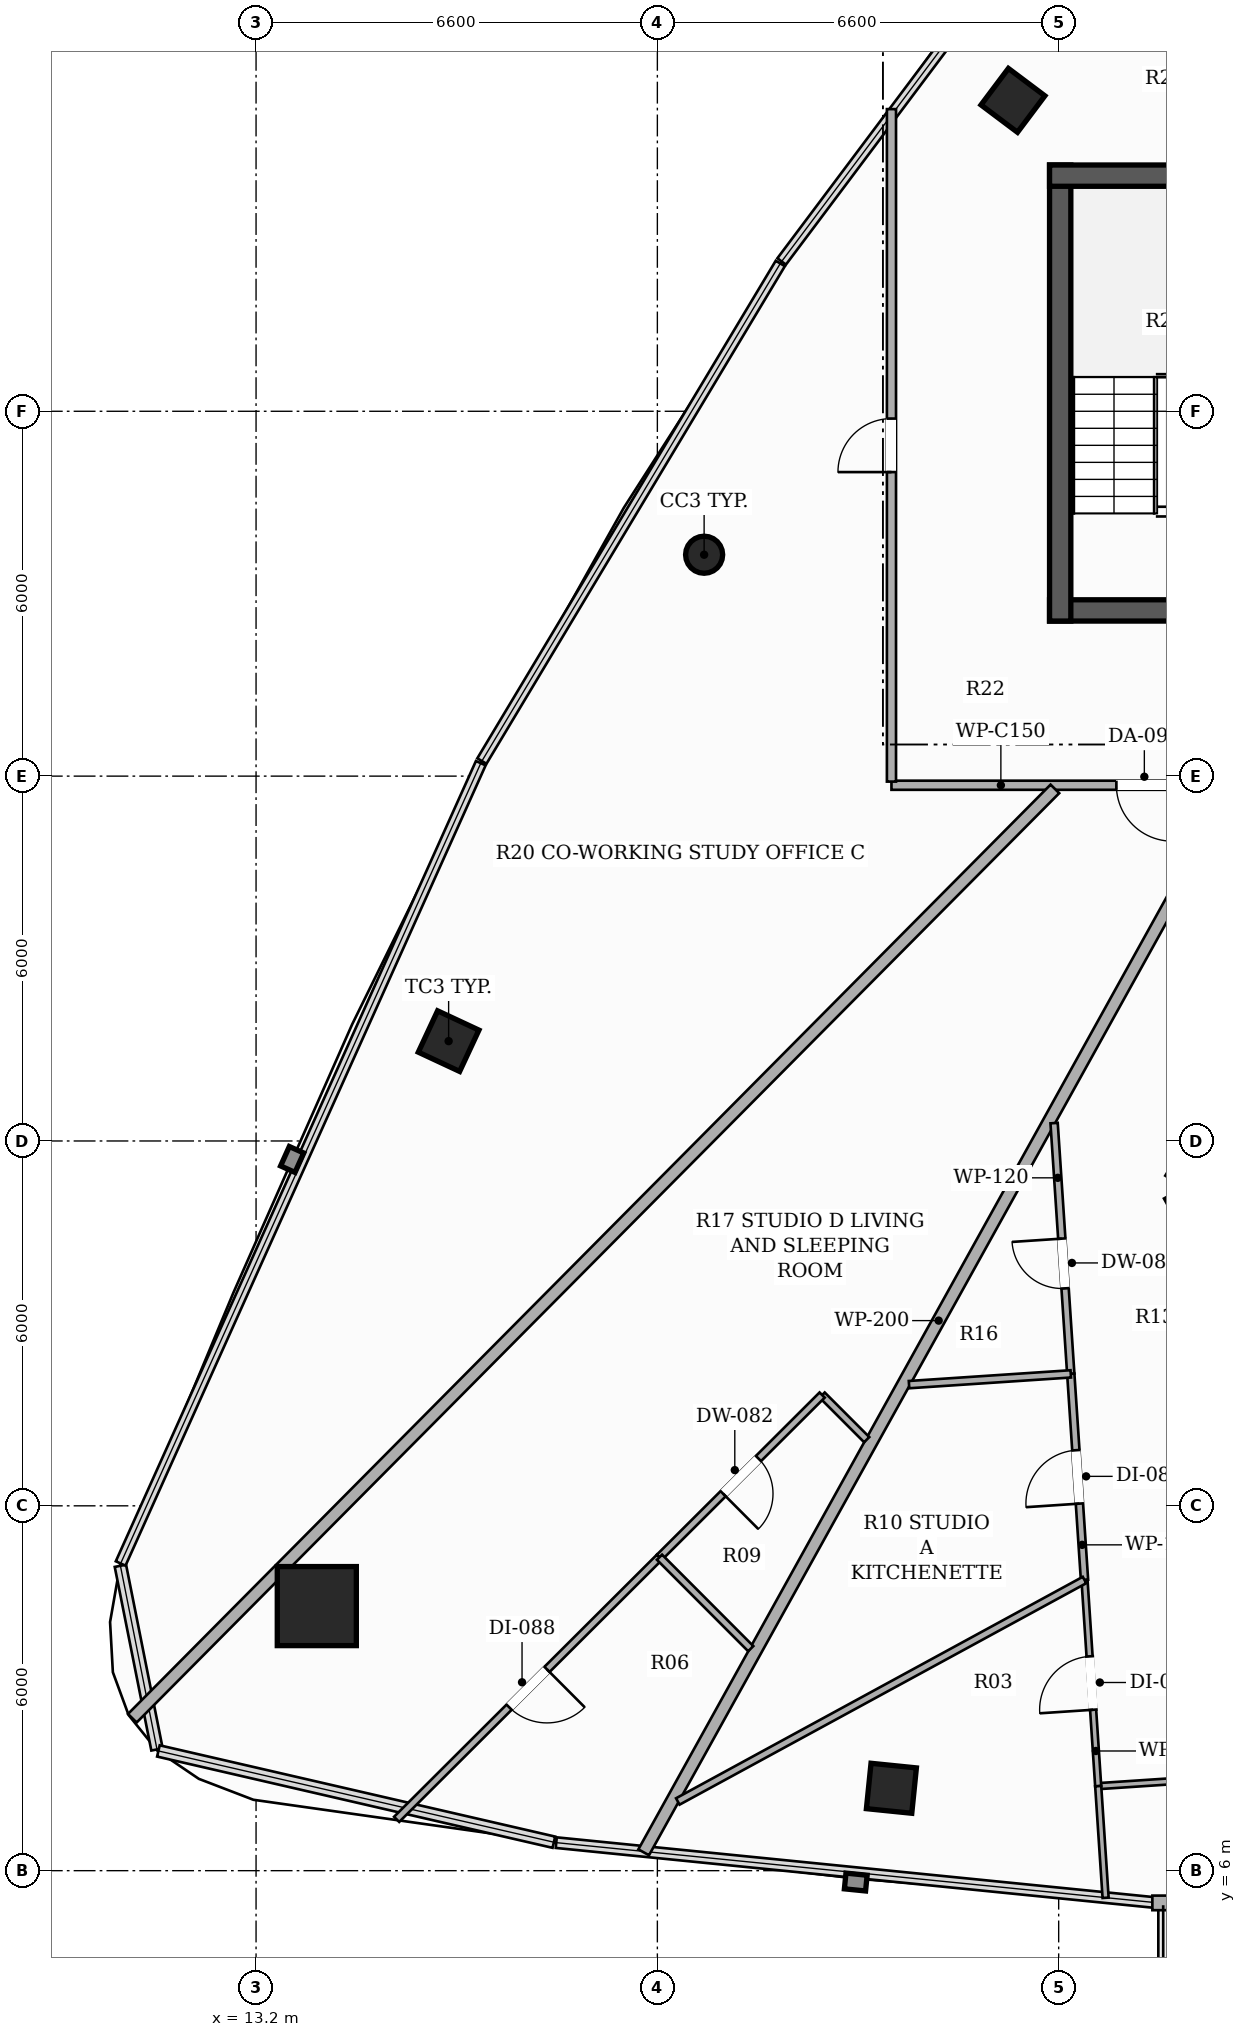
"""IFC4 building model, lengths in metres.
Left out: names, types, materials, properties, quantities, classifications, styles, units other than length and angle.
Written with IfcOpenShell. Run it as: python <this file> out.ifc"""

import sys

from ifc_helpers import new_model, si_unit, direction, frame, frame_2d, origin, origin_2d, place, context, subcontext, project, spatial, rectangle, hollow_rectangle, hollow_circle, extrude, element, fill, save


model = new_model("IFC4")
c1 = context("Model", 3, precision=1e-05, world=origin(), true_north=direction((0.0, 1.0)))
c2 = subcontext(c1, "Body", "Model", "MODEL_VIEW")
j1 = project(units=[si_unit("LENGTHUNIT", "METRE"), si_unit("PLANEANGLEUNIT", "RADIAN")], contexts=[c1])
p1 = place(None, origin())
s1 = spatial("IfcSite", under=j1, at=p1, CompositionType="ELEMENT")
p2 = place(p1, origin())
s2 = spatial("IfcBuilding", under=s1, at=p2, CompositionType="ELEMENT")
p3 = place(p2, frame((0.0, 0.0, 250.25)))
s3 = spatial("IfcBuildingStorey", under=s2, at=p3, CompositionType="ELEMENT", Elevation=250.25)
p4 = place(p3, frame((26.25, 26.725, 0.0), z_axis=(0.0, 0.0, 1.0), x_axis=(1.0, 0.0, 0.0)))
e1 = element("IfcWall", 1, at=p4, inside=s3, PredefinedType="SHEAR", context=c2, shape_type="SweptSolid", body=[
    extrude(rectangle(XDim=13.5, YDim=0.35, at=frame_2d((6.75, 0.0))), origin(), (0.0, 0.0, 1.0), 3.3),
])
p5 = place(p4, frame((4.35, 0.0, 0.0)))
e2 = element("IfcOpeningElement", 2, at=p5, cuts=e1, PredefinedType="OPENING", context=c2, shape_type="SweptSolid", body=[
    extrude(rectangle(XDim=1.05, YDim=2.15, at=frame_2d((0.525, 1.075))), frame((0.0, 0.185, 0.0), z_axis=(0.0, -1.0, 0.0), x_axis=(1.0, 0.0, 0.0)), (0.0, 0.0, 1.0), 0.37),
])
p6 = place(p4, frame((8.3, 0.0, 0.0)))
e3 = element("IfcOpeningElement", 3, at=p6, cuts=e1, PredefinedType="OPENING", context=c2, shape_type="SweptSolid", body=[
    extrude(rectangle(XDim=1.05, YDim=2.15, at=frame_2d((0.525, 1.075))), frame((0.0, 0.185, 0.0), z_axis=(0.0, -1.0, 0.0), x_axis=(1.0, 0.0, 0.0)), (0.0, 0.0, 1.0), 0.37),
])
p7 = place(p3, frame((26.425, 26.55, 0.0), z_axis=(0.0, 0.0, 1.0), x_axis=(0.0, 1.0, 0.0)))
e4 = element("IfcWall", 4, at=p7, inside=s3, PredefinedType="SHEAR", context=c2, shape_type="SweptSolid", body=[
    extrude(rectangle(XDim=7.5, YDim=0.35, at=frame_2d((3.75, 0.0))), origin(), (0.0, 0.0, 1.0), 3.3),
])
p8 = place(p3, frame((26.25, 33.875, 0.0), z_axis=(0.0, 0.0, 1.0), x_axis=(1.0, 0.0, 0.0)))
e5 = element("IfcWall", 5, at=p8, inside=s3, PredefinedType="SHEAR", context=c2, shape_type="SweptSolid", body=[
    extrude(rectangle(XDim=3.6, YDim=0.35, at=frame_2d((1.8, 0.0))), origin(), (0.0, 0.0, 1.0), 3.3),
])
p9 = place(p3, frame((14.199, 10.351, 0.0), z_axis=(0.0, 0.0, 1.0), x_axis=(1.0, 0.0, 0.0)))
e6 = element("IfcColumn", 6, at=p9, inside=s3, PredefinedType="COLUMN", context=c2, shape_type="SweptSolid", body=[
    extrude(hollow_rectangle(XDim=1.3, YDim=1.3, WallThickness=0.04, at=origin_2d()), origin(), (0.0, 0.0, 1.0), 3.3),
])
p10 = place(p3, frame((25.648, 35.113, 0.0), z_axis=(0.0, 0.0, 1.0), x_axis=(0.600420225326, 0.799684658487, 0.0)))
e7 = element("IfcColumn", 7, at=p10, inside=s3, PredefinedType="COLUMN", context=c2, shape_type="SweptSolid", body=[
    extrude(hollow_rectangle(XDim=0.75, YDim=0.75, WallThickness=0.025, at=origin_2d()), origin(), (0.0, 0.0, 1.0), 3.3),
])
p11 = place(p3, frame((20.569, 27.641, 0.0), z_axis=(0.0, 0.0, 1.0), x_axis=(1.0, 0.0, 0.0)))
e8 = element("IfcColumn", 8, at=p11, inside=s3, PredefinedType="COLUMN", context=c2, shape_type="SweptSolid", body=[
    extrude(hollow_circle(Radius=0.305, WallThickness=0.016, at=origin_2d()), origin(), (0.0, 0.0, 1.0), 3.3),
])
for number, where, z_axis, x_axis in (
    (9, (16.367, 19.642, 0.0), (0.0, 0.0, 1.0), (0.423, 0.906, 0.0)),
    (10, (23.649, 7.355, 0.0), (0.0, 0.0, 1.0), (-0.995, 0.101, 0.0)),
):
    element("IfcColumn", number, at=place(p3, frame(where, z_axis=z_axis, x_axis=x_axis)), inside=s3, PredefinedType="COLUMN", context=c2, shape_type="SweptSolid", body=[
        extrude(hollow_rectangle(XDim=0.75, YDim=0.75, WallThickness=0.025, at=origin_2d()), origin(), (0.0, 0.0, 1.0), 3.3),
    ])
p12 = place(p3, frame((27.941, 5.47, 0.0), z_axis=(0.0, 0.0, 1.0), x_axis=(1.0, 0.0, 0.0)))
e11 = element("IfcWall", 11, at=p12, inside=s3, PredefinedType="SOLIDWALL", context=c2, shape_type="SweptSolid", body=[
    extrude(rectangle(XDim=10.118, YDim=0.24, at=frame_2d((5.059, 0.0))), origin(), (0.0, 0.0, 1.0), 2.624),
])
p13 = place(p12, frame((7.62, 0.0, 0.0)))
e12 = element("IfcOpeningElement", 12, at=p13, cuts=e11, PredefinedType="OPENING", context=c2, shape_type="SweptSolid", body=[
    extrude(rectangle(XDim=1.8, YDim=2.2, at=frame_2d((0.9, 1.1))), frame((0.0, 0.13, 0.0), z_axis=(0.0, -1.0, 0.0), x_axis=(1.0, 0.0, 0.0)), (0.0, 0.0, 1.0), 0.26),
])
p14 = place(p3, frame((32.165, 23.85, 0.0), z_axis=(0.0, 0.0, 1.0), x_axis=(-1.0, 0.0, 0.0)))
e13 = element("IfcWall", 13, at=p14, inside=s3, PredefinedType="PARTITIONING", context=c2, shape_type="SweptSolid", body=[
    extrude(rectangle(XDim=8.515, YDim=0.15, at=frame_2d((4.258, 0.0))), origin(), (0.0, 0.0, 1.0), 2.565),
])
p15 = place(p14, frame((1.133, 0.0, 0.0)))
e14 = element("IfcOpeningElement", 14, at=p15, cuts=e13, PredefinedType="OPENING", context=c2, shape_type="SweptSolid", body=[
    extrude(rectangle(XDim=0.92, YDim=2.15, at=frame_2d((0.46, 1.075))), frame((0.0, 0.085, 0.0), z_axis=(0.0, -1.0, 0.0), x_axis=(1.0, 0.0, 0.0)), (0.0, 0.0, 1.0), 0.17),
])
p16 = place(p14, frame((3.896, 0.0, 0.0)))
e15 = element("IfcOpeningElement", 15, at=p16, cuts=e13, PredefinedType="OPENING", context=c2, shape_type="SweptSolid", body=[
    extrude(rectangle(XDim=0.92, YDim=2.15, at=frame_2d((0.46, 1.075))), frame((0.0, 0.085, 0.0), z_axis=(0.0, -1.0, 0.0), x_axis=(1.0, 0.0, 0.0)), (0.0, 0.0, 1.0), 0.17),
])
p17 = place(p3, frame((23.65, 23.91, 0.0), z_axis=(0.0, 0.0, 1.0), x_axis=(0.0, 1.0, 0.0)))
e16 = element("IfcWall", 16, at=p17, inside=s3, PredefinedType="PARTITIONING", context=c2, shape_type="SweptSolid", body=[
    extrude(rectangle(XDim=11.059, YDim=0.15, at=frame_2d((5.53, 0.0))), origin(), (0.0, 0.0, 1.0), 2.492),
])
p18 = place(p17, frame((5.09, 0.0, 0.0)))
e17 = element("IfcOpeningElement", 17, at=p18, cuts=e16, PredefinedType="OPENING", context=c2, shape_type="SweptSolid", body=[
    extrude(rectangle(XDim=0.88, YDim=2.1, at=frame_2d((0.44, 1.05))), frame((0.0, 0.085, 0.0), z_axis=(0.0, -1.0, 0.0), x_axis=(1.0, 0.0, 0.0)), (0.0, 0.0, 1.0), 0.17),
])
p19 = place(p3, frame((28.639, 16.286, 0.0), z_axis=(0.0, 0.0, 1.0), x_axis=(-0.481571453054, 0.876406832244, 0.0)))
e18 = element("IfcWall", 18, at=p19, inside=s3, PredefinedType="PARTITIONING", context=c2, shape_type="SweptSolid", body=[
    extrude(rectangle(XDim=0.918, YDim=0.15, at=frame_2d((0.459, 0.0))), origin(), (0.0, 0.0, 1.0), 3.06),
])
p20 = place(p3, frame((28.217, 17.39, 0.0), z_axis=(0.0, 0.0, 1.0), x_axis=(0.522011859837, 0.852938226479, 0.0)))
e19 = element("IfcWall", 19, at=p20, inside=s3, PredefinedType="PARTITIONING", context=c2, shape_type="SweptSolid", body=[
    extrude(rectangle(XDim=7.504, YDim=0.15, at=frame_2d((3.752, 0.0))), origin(), (0.0, 0.0, 1.0), 2.773),
])
p21 = place(p3, frame((19.575, 6.302, 0.0), z_axis=(0.0, 0.0, 1.0), x_axis=(0.485129783088, 0.874442161358, 0.0)))
e20 = element("IfcWall", 20, at=p21, inside=s3, PredefinedType="PARTITIONING", context=c2, shape_type="SweptSolid", body=[
    extrude(rectangle(XDim=19.999, YDim=0.2, at=frame_2d((10.0, 0.0))), origin(), (0.0, 0.0, 1.0), 2.492),
])
p22 = place(p3, frame((26.338, 23.79, 0.0), z_axis=(0.0, 0.0, 1.0), x_axis=(-0.70454576136, -0.70965855885, 0.0)))
e21 = element("IfcWall", 21, at=p22, inside=s3, PredefinedType="PARTITIONING", context=c2, shape_type="SweptSolid", body=[
    extrude(rectangle(XDim=21.536, YDim=0.2, at=frame_2d((10.768, 0.0))), origin(), (0.0, 0.0, 1.0), 2.492),
])
p23 = place(p3, frame((26.599, 14.17, 0.0), z_axis=(0.0, 0.0, 1.0), x_axis=(-0.066334744758, 0.997797425151, 0.0)))
e22 = element("IfcWall", 22, at=p23, inside=s3, PredefinedType="PARTITIONING", context=c2, shape_type="SweptSolid", body=[
    extrude(rectangle(XDim=4.133, YDim=0.12, at=frame_2d((2.066, 0.0))), origin(), (0.0, 0.0, 1.0), 2.773),
])
p24 = place(p23, frame((1.409, 0.0, 0.0)))
e23 = element("IfcOpeningElement", 23, at=p24, cuts=e22, PredefinedType="OPENING", context=c2, shape_type="SweptSolid", body=[
    extrude(rectangle(XDim=0.82, YDim=2.1, at=frame_2d((0.41, 1.05))), frame((0.0, 0.07, 0.0), z_axis=(0.0, -1.0, 0.0), x_axis=(1.0, 0.0, 0.0)), (0.0, 0.0, 1.0), 0.14),
])
p25 = place(p3, frame((26.825, 10.78, 0.0), z_axis=(0.0, 0.0, 1.0), x_axis=(-0.066471315173, 0.997788336402, 0.0)))
e24 = element("IfcWall", 24, at=p25, inside=s3, PredefinedType="PARTITIONING", context=c2, shape_type="SweptSolid", body=[
    extrude(rectangle(XDim=3.397, YDim=0.12, at=frame_2d((1.699, 0.0))), origin(), (0.0, 0.0, 1.0), 3.06),
])
p26 = place(p25, frame((1.259, 0.0, 0.0)))
e25 = element("IfcOpeningElement", 25, at=p26, cuts=e24, PredefinedType="OPENING", context=c2, shape_type="SweptSolid", body=[
    extrude(rectangle(XDim=0.88, YDim=2.1, at=frame_2d((0.44, 1.05))), frame((0.0, 0.07, 0.0), z_axis=(0.0, -1.0, 0.0), x_axis=(1.0, 0.0, 0.0)), (0.0, 0.0, 1.0), 0.14),
])
p27 = place(p3, frame((37.877, 8.11, 0.0), z_axis=(0.0, 0.0, 1.0), x_axis=(-0.997794804299, -0.066374155471, 0.0)))
e26 = element("IfcWall", 26, at=p27, inside=s3, PredefinedType="PARTITIONING", context=c2, shape_type="SweptSolid", body=[
    extrude(rectangle(XDim=10.851, YDim=0.1, at=frame_2d((5.425, 0.0))), origin(), (0.0, 0.0, 1.0), 2.492),
])
p28 = place(p27, frame((5.68, 0.0, 0.0)))
e27 = element("IfcOpeningElement", 27, at=p28, cuts=e26, PredefinedType="OPENING", context=c2, shape_type="SweptSolid", body=[
    extrude(rectangle(XDim=0.88, YDim=2.1, at=frame_2d((0.44, 1.05))), frame((0.0, 0.06, 0.0), z_axis=(0.0, -1.0, 0.0), x_axis=(1.0, 0.0, 0.0)), (0.0, 0.0, 1.0), 0.12),
])
p29 = place(p3, frame((27.05, 7.39, 0.0), z_axis=(0.0, 0.0, 1.0), x_axis=(-0.066251929929, 0.997802927326, 0.0)))
e28 = element("IfcWall", 28, at=p29, inside=s3, PredefinedType="PARTITIONING", context=c2, shape_type="SweptSolid", body=[
    extrude(rectangle(XDim=3.398, YDim=0.1, at=frame_2d((1.699, 0.0))), origin(), (0.0, 0.0, 1.0), 2.492),
])
p30 = place(p29, frame((1.259, 0.0, 0.0)))
e29 = element("IfcOpeningElement", 29, at=p30, cuts=e28, PredefinedType="OPENING", context=c2, shape_type="SweptSolid", body=[
    extrude(rectangle(XDim=0.88, YDim=2.1, at=frame_2d((0.44, 1.05))), frame((0.0, 0.06, 0.0), z_axis=(0.0, -1.0, 0.0), x_axis=(1.0, 0.0, 0.0)), (0.0, 0.0, 1.0), 0.12),
])
p31 = place(p3, frame((26.599, 14.17, 0.0), z_axis=(0.0, 0.0, 1.0), x_axis=(-0.99779365881, -0.066391373223, 0.0)))
e30 = element("IfcWall", 30, at=p31, inside=s3, PredefinedType="PARTITIONING", context=c2, shape_type="SweptSolid", body=[
    extrude(rectangle(XDim=2.666, YDim=0.12, at=frame_2d((1.333, 0.0))), origin(), (0.0, 0.0, 1.0), 2.773),
])
p32 = place(p3, frame((26.825, 10.78, 0.0), z_axis=(0.0, 0.0, 1.0), x_axis=(-0.87825059366, -0.478200684583, 0.0)))
e31 = element("IfcWall", 31, at=p32, inside=s3, PredefinedType="PARTITIONING", context=c2, shape_type="SweptSolid", body=[
    extrude(rectangle(XDim=7.616, YDim=0.12, at=frame_2d((3.808, 0.0))), origin(), (0.0, 0.0, 1.0), 2.492),
])
p33 = place(p3, frame((27.172, 5.554, 0.0), z_axis=(0.0, 0.0, 1.0), x_axis=(-0.066342877953, 0.997796884413, 0.0)))
e32 = element("IfcWall", 32, at=p33, inside=s3, PredefinedType="PARTITIONING", context=c2, shape_type="SweptSolid", body=[
    extrude(rectangle(XDim=1.84, YDim=0.1, at=frame_2d((0.92, 0.0))), origin(), (0.0, 0.0, 1.0), 2.492),
])
p34 = place(p3, frame((23.243, 13.088, 0.0), z_axis=(0.0, 0.0, 1.0), x_axis=(-0.706518163511, 0.707694909286, 0.0)))
e33 = element("IfcWall", 33, at=p34, inside=s3, PredefinedType="PARTITIONING", context=c2, shape_type="SweptSolid", body=[
    extrude(rectangle(XDim=1.037, YDim=0.12, at=frame_2d((0.519, 0.0))), origin(), (0.0, 0.0, 1.0), 3.06),
])
p35 = place(p3, frame((22.51, 13.822, 0.0), z_axis=(0.0, 0.0, 1.0), x_axis=(-0.708172404385, -0.706039549649, 0.0)))
e34 = element("IfcWall", 34, at=p35, inside=s3, PredefinedType="PARTITIONING", context=c2, shape_type="SweptSolid", body=[
    extrude(rectangle(XDim=3.777, YDim=0.12, at=frame_2d((1.889, 0.0))), origin(), (0.0, 0.0, 1.0), 2.773),
])
p36 = place(p35, frame((1.479, 0.0, 0.0)))
e35 = element("IfcOpeningElement", 35, at=p36, cuts=e34, PredefinedType="OPENING", context=c2, shape_type="SweptSolid", body=[
    extrude(rectangle(XDim=0.82, YDim=2.1, at=frame_2d((0.41, 1.05))), frame((0.0, 0.07, 0.0), z_axis=(0.0, -1.0, 0.0), x_axis=(1.0, 0.0, 0.0)), (0.0, 0.0, 1.0), 0.14),
])
p37 = place(p3, frame((19.835, 11.155, 0.0), z_axis=(0.0, 0.0, 1.0), x_axis=(-0.708085833798, -0.706126371108, 0.0)))
e36 = element("IfcWall", 36, at=p37, inside=s3, PredefinedType="PARTITIONING", context=c2, shape_type="SweptSolid", body=[
    extrude(rectangle(XDim=6.105, YDim=0.12, at=frame_2d((3.053, 0.0))), origin(), (0.0, 0.0, 1.0), 2.492),
])
p38 = place(p37, frame((2.613, 0.0, 0.0)))
e37 = element("IfcOpeningElement", 37, at=p38, cuts=e36, PredefinedType="OPENING", context=c2, shape_type="SweptSolid", body=[
    extrude(rectangle(XDim=0.88, YDim=2.1, at=frame_2d((0.44, 1.05))), frame((0.0, 0.07, 0.0), z_axis=(0.0, -1.0, 0.0), x_axis=(1.0, 0.0, 0.0)), (0.0, 0.0, 1.0), 0.14),
])
p39 = place(p3, frame((21.336, 9.651, 0.0), z_axis=(0.0, 0.0, 1.0), x_axis=(-0.70635958505, 0.707853188597, 0.0)))
e38 = element("IfcWall", 38, at=p39, inside=s3, PredefinedType="PARTITIONING", context=c2, shape_type="SweptSolid", body=[
    extrude(rectangle(XDim=2.125, YDim=0.12, at=frame_2d((1.062, 0.0))), origin(), (0.0, 0.0, 1.0), 2.773),
])
p40 = place(p24, origin())
e39 = element("IfcDoor", 39, at=p40, inside=s3, OperationType="SINGLE_SWING_RIGHT", PredefinedType="DOOR", context=c2, shape_type="SweptSolid", body=[
    extrude(rectangle(XDim=0.82, YDim=2.1, at=frame_2d((0.41, 1.05))), frame((0.0, 0.025, 0.0), z_axis=(0.0, -1.0, 0.0), x_axis=(1.0, 0.0, 0.0)), (0.0, 0.0, 1.0), 0.05),
])
fill(e23, e39)
p41 = place(p26, origin())
e40 = element("IfcDoor", 40, at=p41, inside=s3, OperationType="SINGLE_SWING_LEFT", PredefinedType="DOOR", context=c2, shape_type="SweptSolid", body=[
    extrude(rectangle(XDim=0.88, YDim=2.1, at=frame_2d((0.44, 1.05))), frame((0.0, 0.025, 0.0), z_axis=(0.0, -1.0, 0.0), x_axis=(1.0, 0.0, 0.0)), (0.0, 0.0, 1.0), 0.05),
])
fill(e25, e40)
p42 = place(p30, origin())
e41 = element("IfcDoor", 41, at=p42, inside=s3, OperationType="SINGLE_SWING_LEFT", PredefinedType="DOOR", context=c2, shape_type="SweptSolid", body=[
    extrude(rectangle(XDim=0.88, YDim=2.1, at=frame_2d((0.44, 1.05))), frame((0.0, 0.025, 0.0), z_axis=(0.0, -1.0, 0.0), x_axis=(1.0, 0.0, 0.0)), (0.0, 0.0, 1.0), 0.05),
])
fill(e29, e41)
p43 = place(p18, origin())
e42 = element("IfcDoor", 42, at=p43, inside=s3, OperationType="SINGLE_SWING_LEFT", PredefinedType="DOOR", context=c2, shape_type="SweptSolid", body=[
    extrude(rectangle(XDim=0.88, YDim=2.1, at=frame_2d((0.44, 1.05))), frame((0.0, 0.025, 0.0), z_axis=(0.0, -1.0, 0.0), x_axis=(1.0, 0.0, 0.0)), (0.0, 0.0, 1.0), 0.05),
])
fill(e17, e42)
p44 = place(p16, origin())
e43 = element("IfcDoor", 43, at=p44, inside=s3, OperationType="SINGLE_SWING_LEFT", PredefinedType="DOOR", context=c2, shape_type="SweptSolid", body=[
    extrude(rectangle(XDim=0.92, YDim=2.15, at=frame_2d((0.46, 1.075))), frame((0.0, 0.025, 0.0), z_axis=(0.0, -1.0, 0.0), x_axis=(1.0, 0.0, 0.0)), (0.0, 0.0, 1.0), 0.05),
])
fill(e15, e43)
p45 = place(p36, origin())
e44 = element("IfcDoor", 44, at=p45, inside=s3, OperationType="SINGLE_SWING_RIGHT", PredefinedType="DOOR", context=c2, shape_type="SweptSolid", body=[
    extrude(rectangle(XDim=0.82, YDim=2.1, at=frame_2d((0.41, 1.05))), frame((0.0, 0.025, 0.0), z_axis=(0.0, -1.0, 0.0), x_axis=(1.0, 0.0, 0.0)), (0.0, 0.0, 1.0), 0.05),
])
fill(e35, e44)
p46 = place(p38, origin())
e45 = element("IfcDoor", 45, at=p46, inside=s3, OperationType="SINGLE_SWING_LEFT", PredefinedType="DOOR", context=c2, shape_type="SweptSolid", body=[
    extrude(rectangle(XDim=0.88, YDim=2.1, at=frame_2d((0.44, 1.05))), frame((0.0, 0.025, 0.0), z_axis=(0.0, -1.0, 0.0), x_axis=(1.0, 0.0, 0.0)), (0.0, 0.0, 1.0), 0.05),
])
fill(e37, e45)
save(model, sys.argv[1])
